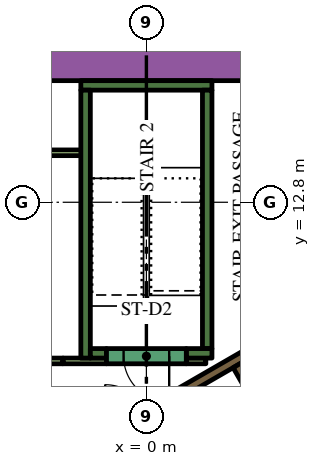
"""IFC4 building model, lengths in metres.
Left out: names, types, materials, properties, quantities, classifications, styles, units other than length and angle.
Written with IfcOpenShell. Run it as: python <this file> out.ifc"""

import sys

from ifc_helpers import new_model, si_unit, direction, frame, frame_2d, origin, place, context, subcontext, project, spatial, rectangle, extrude, element, fill, save


model = new_model("IFC4")
c1 = context("Model", 3, precision=1e-05, world=origin(), true_north=direction((0.0, 1.0)))
c2 = subcontext(c1, "Body", "Model", "MODEL_VIEW")
j1 = project(units=[si_unit("LENGTHUNIT", "METRE"), si_unit("PLANEANGLEUNIT", "RADIAN")], contexts=[c1])
p1 = place(None, origin())
s1 = spatial("IfcSite", under=j1, at=p1, CompositionType="ELEMENT")
p2 = place(p1, origin())
s2 = spatial("IfcBuilding", under=s1, at=p2, CompositionType="ELEMENT")
p3 = place(p2, frame((0.0, 0.0, 103.2)))
s3 = spatial("IfcBuildingStorey", under=s2, at=p3, CompositionType="ELEMENT", Elevation=103.2)
p4 = place(p3, frame((-4.224, 16.45, 0.0), z_axis=(0.0, 0.0, 1.0), x_axis=(1.0, 0.0, 0.0)))
e1 = element("IfcWall", 1, at=p4, inside=s3, PredefinedType="SOLIDWALL", context=c2, shape_type="SweptSolid", body=[
    extrude(rectangle(XDim=9.488, YDim=0.9, at=frame_2d((4.744, 0.0))), origin(), (0.0, 0.0, 1.0), 3.9),
])
p5 = place(p3, frame((-1.725, 15.875, 0.0), z_axis=(0.0, 0.0, 1.0), x_axis=(1.0, 0.0, 0.0)))
e2 = element("IfcWall", 2, at=p5, inside=s3, PredefinedType="SOLIDWALL", context=c2, shape_type="SweptSolid", body=[
    extrude(rectangle(XDim=3.45, YDim=0.25, at=frame_2d((1.725, 0.0))), origin(), (0.0, 0.0, 1.0), 3.9),
])
p6 = place(p3, frame((1.6, 8.95, 0.0), z_axis=(0.0, 0.0, 1.0), x_axis=(0.0, 1.0, 0.0)))
e3 = element("IfcWall", 3, at=p6, inside=s3, PredefinedType="SOLIDWALL", context=c2, shape_type="SweptSolid", body=[
    extrude(rectangle(XDim=6.8, YDim=0.25, at=frame_2d((3.4, 0.0))), origin(), (0.0, 0.0, 1.0), 3.9),
])
p7 = place(p3, frame((1.05, 8.825, 0.0), z_axis=(0.0, 0.0, 1.0), x_axis=(1.0, 0.0, 0.0)))
e4 = element("IfcWall", 4, at=p7, inside=s3, PredefinedType="SOLIDWALL", context=c2, shape_type="SweptSolid", body=[
    extrude(rectangle(XDim=0.675, YDim=0.25, at=frame_2d((0.337, 0.0))), origin(), (0.0, 0.0, 1.0), 3.9),
])
p8 = place(p3, frame((-1.6, 8.7, 0.0), z_axis=(0.0, 0.0, 1.0), x_axis=(0.0, 1.0, 0.0)))
e5 = element("IfcWall", 5, at=p8, inside=s3, PredefinedType="SOLIDWALL", context=c2, shape_type="SweptSolid", body=[
    extrude(rectangle(XDim=7.05, YDim=0.25, at=frame_2d((3.525, 0.0))), origin(), (0.0, 0.0, 1.0), 3.9),
])
p9 = place(p3, frame((-1.475, 8.825, 0.0), z_axis=(0.0, 0.0, 1.0), x_axis=(1.0, 0.0, 0.0)))
e6 = element("IfcWall", 6, at=p9, inside=s3, PredefinedType="SOLIDWALL", context=c2, shape_type="SweptSolid", body=[
    extrude(rectangle(XDim=0.425, YDim=0.25, at=frame_2d((0.212, 0.0))), origin(), (0.0, 0.0, 1.0), 3.9),
])
p10 = place(p3, frame((0.314, 7.456, 0.0), z_axis=(0.0, 0.0, 1.0), x_axis=(0.866013897511, 0.50001992892, 0.0)))
e7 = element("IfcWall", 7, at=p10, inside=s3, PredefinedType="SOLIDWALL", context=c2, shape_type="SweptSolid", body=[
    extrude(rectangle(XDim=3.268, YDim=0.25, at=frame_2d((1.634, 0.0))), origin(), (0.0, 0.0, 1.0), 3.9),
])
p11 = place(p3, frame((-2.196, 8.625, 0.0), z_axis=(0.0, 0.0, 1.0), x_axis=(1.0, 0.0, 0.0)))
e8 = element("IfcWall", 8, at=p11, inside=s3, PredefinedType="PARTITIONING", context=c2, shape_type="SweptSolid", body=[
    extrude(rectangle(XDim=1.146, YDim=0.15, at=frame_2d((0.573, 0.0))), origin(), (0.0, 0.0, 1.0), 2.75),
])
p12 = place(p3, frame((-2.871, 14.102, 0.0), z_axis=(0.0, 0.0, 1.0), x_axis=(1.0, 0.0, 0.0)))
e9 = element("IfcWall", 9, at=p12, inside=s3, PredefinedType="PARTITIONING", context=c2, shape_type="SweptSolid", body=[
    extrude(rectangle(XDim=1.196, YDim=0.15, at=frame_2d((0.598, 0.0))), origin(), (0.0, 0.0, 1.0), 2.75),
])
p13 = place(p3, frame((1.05, 8.625, 0.0), z_axis=(0.0, 0.0, 1.0), x_axis=(1.0, 0.0, 0.0)))
e10 = element("IfcWall", 10, at=p13, inside=s3, PredefinedType="PARTITIONING", context=c2, shape_type="SweptSolid", body=[
    extrude(rectangle(XDim=0.514, YDim=0.15, at=frame_2d((0.257, 0.0))), origin(), (0.0, 0.0, 1.0), 2.75),
])
p14 = place(p3, frame((8.565, -2.185, 0.0), z_axis=(0.0, 0.0, 1.0), x_axis=(-0.499997954832, 0.866026584559, 0.0)))
e11 = element("IfcWall", 11, at=p14, inside=s3, PredefinedType="SOLIDWALL", context=c2, shape_type="SweptSolid", body=[
    extrude(rectangle(XDim=12.35, YDim=0.25, at=frame_2d((6.175, 0.0))), origin(), (0.0, 0.0, 1.0), 3.9),
])
p15 = place(p14, frame((5.725, 0.0, 0.0)))
e12 = element("IfcOpeningElement", 12, at=p15, cuts=e11, PredefinedType="OPENING", context=c2, shape_type="SweptSolid", body=[
    extrude(rectangle(XDim=0.9, YDim=2.1, at=frame_2d((0.45, 1.05))), frame((0.0, 0.135, 0.0), z_axis=(0.0, -1.0, 0.0), x_axis=(1.0, 0.0, 0.0)), (0.0, 0.0, 1.0), 0.27),
])
p16 = place(p3, frame((1.05, 8.75, 0.0), z_axis=(0.0, 0.0, 1.0), x_axis=(-1.0, 0.0, 0.0)))
e13 = element("IfcWall", 13, at=p16, inside=s3, PredefinedType="SOLIDWALL", context=c2, shape_type="SweptSolid", body=[
    extrude(rectangle(XDim=2.1, YDim=0.4, at=frame_2d((1.05, 0.0))), origin(), (0.0, 0.0, 1.0), 3.9),
])
p17 = place(p16, frame((0.45, 0.0, 0.0)))
e14 = element("IfcOpeningElement", 14, at=p17, cuts=e13, PredefinedType="OPENING", context=c2, shape_type="SweptSolid", body=[
    extrude(rectangle(XDim=1.2, YDim=2.1, at=frame_2d((0.6, 1.05))), frame((0.0, 0.21, 0.0), z_axis=(0.0, -1.0, 0.0), x_axis=(1.0, 0.0, 0.0)), (0.0, 0.0, 1.0), 0.42),
])
p18 = place(p3, frame((-2.196, 8.625, 0.0), z_axis=(0.0, 0.0, 1.0), x_axis=(-1.0, 0.0, 0.0)))
e15 = element("IfcWall", 15, at=p18, inside=s3, PredefinedType="PARTITIONING", context=c2, shape_type="SweptSolid", body=[
    extrude(rectangle(XDim=1.8, YDim=0.15, at=frame_2d((0.9, 0.0))), origin(), (0.0, 0.0, 1.0), 2.75),
])
p19 = place(p18, frame((0.45, 0.0, 0.0)))
e16 = element("IfcOpeningElement", 16, at=p19, cuts=e15, PredefinedType="OPENING", context=c2, shape_type="SweptSolid", body=[
    extrude(rectangle(XDim=0.9, YDim=2.1, at=frame_2d((0.45, 1.05))), frame((0.0, 0.085, 0.0), z_axis=(0.0, -1.0, 0.0), x_axis=(1.0, 0.0, 0.0)), (0.0, 0.0, 1.0), 0.17),
])
p20 = place(p17, origin())
e17 = element("IfcDoor", 17, at=p20, inside=s3, OperationType="SINGLE_SWING_LEFT", PredefinedType="DOOR", context=c2, shape_type="SweptSolid", body=[
    extrude(rectangle(XDim=1.2, YDim=2.1, at=frame_2d((0.6, 1.05))), frame((0.0, 0.025, 0.0), z_axis=(0.0, -1.0, 0.0), x_axis=(1.0, 0.0, 0.0)), (0.0, 0.0, 1.0), 0.05),
])
fill(e14, e17)
save(model, sys.argv[1])
